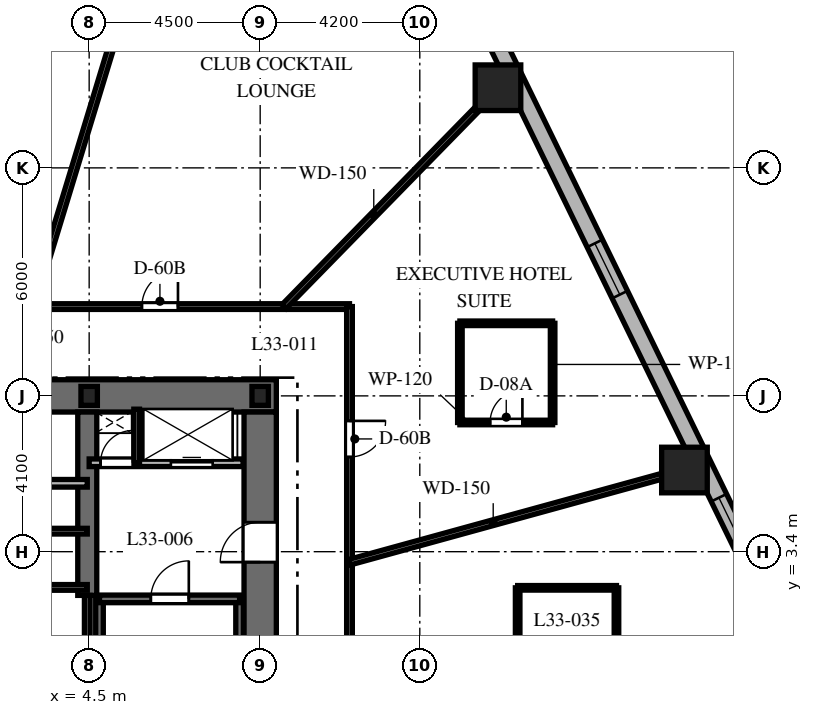
"""IFC4 building model, lengths in metres.
Left out: names, types, materials, properties, quantities, classifications, styles, units other than length and angle.
Written with IfcOpenShell. Run it as: python <this file> out.ifc"""

import sys

from ifc_helpers import new_model, si_unit, direction, frame, frame_2d, origin, origin_2d, place, context, subcontext, project, spatial, rectangle, i_section, extrude, element, fill, save


model = new_model("IFC4")
c1 = context("Model", 3, precision=1e-05, world=origin(), true_north=direction((0.0, 1.0)))
c2 = subcontext(c1, "Body", "Model", "MODEL_VIEW")
j1 = project(units=[si_unit("LENGTHUNIT", "METRE"), si_unit("PLANEANGLEUNIT", "RADIAN")], contexts=[c1])
p1 = place(None, origin())
s1 = spatial("IfcSite", under=j1, at=p1, CompositionType="ELEMENT")
p2 = place(p1, origin())
s2 = spatial("IfcBuilding", under=s1, at=p2, CompositionType="ELEMENT")
p3 = place(p2, frame((0.0, 0.0, 135.8)))
s3 = spatial("IfcBuildingStorey", under=s2, at=p3, CompositionType="ELEMENT", Elevation=135.8)
p4 = place(p3, frame((1.85, 7.5, 0.0), z_axis=(0.0, 0.0, 1.0), x_axis=(1.0, 0.0, 0.0)))
e1 = element("IfcWall", 1, at=p4, inside=s3, PredefinedType="SHEAR", context=c2, shape_type="SweptSolid", body=[
    extrude(rectangle(XDim=7.575, YDim=0.85, at=frame_2d((3.788, 0.0))), origin(), (0.0, 0.0, 1.0), 3.7),
])
p5 = place(p3, frame((9.0, -7.075, 0.0), z_axis=(0.0, 0.0, 1.0), x_axis=(0.0, 1.0, 0.0)))
e2 = element("IfcWall", 2, at=p5, inside=s3, PredefinedType="SHEAR", context=c2, shape_type="SweptSolid", body=[
    extrude(rectangle(XDim=14.15, YDim=0.85, at=frame_2d((7.075, 0.0))), origin(), (0.0, 0.0, 1.0), 3.7),
])
p6 = place(p5, frame((10.2, 0.0, 0.0)))
e3 = element("IfcOpeningElement", 3, at=p6, cuts=e2, PredefinedType="OPENING", context=c2, shape_type="SweptSolid", body=[
    extrude(rectangle(XDim=1.05, YDim=2.15, at=frame_2d((0.525, 1.075))), frame((0.0, 0.435, 0.0), z_axis=(0.0, -1.0, 0.0), x_axis=(1.0, 0.0, 0.0)), (0.0, 0.0, 1.0), 0.87),
])
p7 = place(p3, frame((4.45, 2.25, 0.0), z_axis=(0.0, 0.0, 1.0), x_axis=(0.0, 1.0, 0.0)))
e4 = element("IfcWall", 4, at=p7, inside=s3, PredefinedType="SHEAR", context=c2, shape_type="SweptSolid", body=[
    extrude(rectangle(XDim=4.825, YDim=0.5, at=frame_2d((2.413, 0.0))), origin(), (0.0, 0.0, 1.0), 3.7),
])
for number, where, z_axis, x_axis in (
    (5, (4.772, -6.985, 0.0), (0.0, 0.0, 1.0), (0.0, 1.0, 0.0)),
    (6, (8.458, -6.985, 0.0), (0.0, 0.0, 1.0), (0.0, 1.0, 0.0)),
):
    element("IfcWall", number, at=place(p3, frame(where, z_axis=z_axis, x_axis=x_axis)), inside=s3, PredefinedType="SHEAR", context=c2, shape_type="SweptSolid", body=[
        extrude(rectangle(XDim=9.143, YDim=0.2, at=frame_2d((4.572, 0.0))), origin(), (0.0, 0.0, 1.0), 3.7),
    ])
p8 = place(p3, frame((4.772, 2.158, 0.0), z_axis=(0.0, 0.0, 1.0), x_axis=(1.0, 0.0, 0.0)))
e7 = element("IfcWall", 7, at=p8, inside=s3, PredefinedType="SHEAR", context=c2, shape_type="SweptSolid", body=[
    extrude(rectangle(XDim=3.686, YDim=0.2, at=frame_2d((1.843, 0.0))), origin(), (0.0, 0.0, 1.0), 3.7),
])
p9 = place(p8, frame((1.35, 0.0, 0.0)))
e8 = element("IfcOpeningElement", 8, at=p9, cuts=e7, PredefinedType="OPENING", context=c2, shape_type="SweptSolid", body=[
    extrude(rectangle(XDim=1.0, YDim=2.15, at=frame_2d((0.5, 1.075))), frame((0.0, 0.11, 0.0), z_axis=(0.0, -1.0, 0.0), x_axis=(1.0, 0.0, 0.0)), (0.0, 0.0, 1.0), 0.22),
])
for number, where, z_axis, x_axis in (
    (9, (9.0, 7.5, 0.0), (0.0, 0.0, 1.0), (1.0, 0.0, 0.0)),
    (10, (4.5, 7.5, 0.0), (0.0, 0.0, 1.0), (1.0, 0.0, 0.0)),
):
    element("IfcColumn", number, at=place(p3, frame(where, z_axis=z_axis, x_axis=x_axis)), inside=s3, PredefinedType="COLUMN", context=c2, shape_type="SweptSolid", body=[
        extrude(i_section(OverallWidth=0.432, OverallDepth=0.498, WebThickness=0.056, FlangeThickness=0.089, at=origin_2d()), origin(), (0.0, 0.0, 1.0), 3.7),
    ])
for number, where, z_axis, x_axis in (
    (11, (20.164, 5.549, 0.0), (0.0, 0.0, 1.0), (1.0, 0.0, 0.0)),
    (12, (15.257, 15.609, 0.0), (0.0, 0.0, 1.0), (1.0, 0.0, 0.0)),
):
    element("IfcColumn", number, at=place(p3, frame(where, z_axis=z_axis, x_axis=x_axis)), inside=s3, PredefinedType="COLUMN", context=c2, shape_type="SweptSolid", body=[
        extrude(rectangle(XDim=1.2, YDim=1.2, at=origin_2d()), origin(), (0.0, 0.0, 1.0), 3.7),
    ])
p10 = place(p3, frame((22.238, 2.427, 0.0), z_axis=(0.0, 0.0, 1.0), x_axis=(-0.438374803278, 0.898792262901, 0.0)))
e13 = element("IfcWall", 13, at=p10, inside=s3, PredefinedType="SOLIDWALL", context=c2, shape_type="SweptSolid", body=[
    extrude(rectangle(XDim=18.618, YDim=0.45, at=frame_2d((9.309, 0.0))), origin(), (0.0, 0.0, 1.0), 3.38),
])
p11 = place(p10, frame((8.61, 0.0, 0.8)))
e14 = element("IfcOpeningElement", 14, at=p11, cuts=e13, PredefinedType="OPENING", context=c2, shape_type="SweptSolid", body=[
    extrude(rectangle(XDim=1.5, YDim=1.8, at=frame_2d((0.75, 0.9))), frame((0.0, 0.235, 0.0), z_axis=(0.0, -1.0, 0.0), x_axis=(1.0, 0.0, 0.0)), (0.0, 0.0, 1.0), 0.47),
])
p12 = place(p10, frame((16.006, 0.0, 0.8)))
e15 = element("IfcOpeningElement", 15, at=p12, cuts=e13, PredefinedType="OPENING", context=c2, shape_type="SweptSolid", body=[
    extrude(rectangle(XDim=1.5, YDim=1.8, at=frame_2d((0.75, 0.9))), frame((0.0, 0.235, 0.0), z_axis=(0.0, -1.0, 0.0), x_axis=(1.0, 0.0, 0.0)), (0.0, 0.0, 1.0), 0.47),
])
p13 = place(p10, frame((1.163, 0.0, 0.8)))
e16 = element("IfcOpeningElement", 16, at=p13, cuts=e13, PredefinedType="OPENING", context=c2, shape_type="SweptSolid", body=[
    extrude(rectangle(XDim=1.5, YDim=1.8, at=frame_2d((0.75, 0.9))), frame((0.0, 0.235, 0.0), z_axis=(0.0, -1.0, 0.0), x_axis=(1.0, 0.0, 0.0)), (0.0, 0.0, 1.0), 0.47),
])
p14 = place(p3, frame((4.5, 5.74, 0.0), z_axis=(0.0, 0.0, 1.0), x_axis=(1.0, 0.0, 0.0)))
e17 = element("IfcWall", 17, at=p14, inside=s3, PredefinedType="PARTITIONING", context=c2, shape_type="SweptSolid", body=[
    extrude(rectangle(XDim=4.05, YDim=0.2, at=frame_2d((2.025, 0.0))), origin(), (0.0, 0.0, 1.0), 3.38),
])
p15 = place(p14, frame((0.3, 0.0, 0.0)))
e18 = element("IfcOpeningElement", 18, at=p15, cuts=e17, PredefinedType="OPENING", context=c2, shape_type="SweptSolid", body=[
    extrude(rectangle(XDim=0.85, YDim=2.03, at=frame_2d((0.425, 1.015))), frame((0.0, 0.11, 0.0), z_axis=(0.0, -1.0, 0.0), x_axis=(1.0, 0.0, 0.0)), (0.0, 0.0, 1.0), 0.22),
])
p16 = place(p14, frame((2.15, 0.0, 0.0)))
e19 = element("IfcOpeningElement", 19, at=p16, cuts=e17, PredefinedType="OPENING", context=c2, shape_type="SweptSolid", body=[
    extrude(rectangle(XDim=1.1, YDim=2.2, at=frame_2d((0.55, 1.1))), frame((0.0, 0.11, 0.0), z_axis=(0.0, -1.0, 0.0), x_axis=(1.0, 0.0, 0.0)), (0.0, 0.0, 1.0), 0.22),
])
p17 = place(p3, frame((5.75, 5.74, 0.0), z_axis=(0.0, 0.0, 1.0), x_axis=(0.0, 1.0, 0.0)))
e20 = element("IfcWall", 20, at=p17, inside=s3, PredefinedType="PARTITIONING", context=c2, shape_type="SweptSolid", body=[
    extrude(rectangle(XDim=1.41, YDim=0.15, at=frame_2d((0.705, 0.0))), origin(), (0.0, 0.0, 1.0), 3.38),
])
p18 = place(p3, frame((1.85, 5.2, 0.0), z_axis=(0.0, 0.0, 1.0), x_axis=(1.0, 0.0, 0.0)))
e21 = element("IfcWall", 21, at=p18, inside=s3, PredefinedType="PARTITIONING", context=c2, shape_type="SweptSolid", body=[
    extrude(rectangle(XDim=2.6, YDim=0.2, at=frame_2d((1.3, 0.0))), origin(), (0.0, 0.0, 1.0), 3.38),
])
p19 = place(p3, frame((4.45, -1.972, 0.0), z_axis=(0.0, 0.0, 1.0), x_axis=(0.0, 1.0, 0.0)))
e22 = element("IfcWall", 22, at=p19, inside=s3, PredefinedType="PARTITIONING", context=c2, shape_type="SweptSolid", body=[
    extrude(rectangle(XDim=4.222, YDim=0.15, at=frame_2d((2.111, 0.0))), origin(), (0.0, 0.0, 1.0), 3.38),
])
for number, where, z_axis, x_axis in (
    (23, (1.9, 3.94, 0.0), (0.0, 0.0, 1.0), (1.0, 0.0, 0.0)),
    (24, (1.9, 2.46, 0.0), (0.0, 0.0, 1.0), (1.0, 0.0, 0.0)),
):
    element("IfcWall", number, at=place(p3, frame(where, z_axis=z_axis, x_axis=x_axis)), inside=s3, PredefinedType="PARTITIONING", context=c2, shape_type="SweptSolid", body=[
        extrude(rectangle(XDim=2.55, YDim=0.15, at=frame_2d((1.275, 0.0))), origin(), (0.0, 0.0, 1.0), 3.38),
    ])
p20 = place(p3, frame((-11.35, 9.85, 0.0), z_axis=(0.0, 0.0, 1.0), x_axis=(1.0, 0.0, 0.0)))
e25 = element("IfcWall", 25, at=p20, inside=s3, PredefinedType="PARTITIONING", context=c2, shape_type="SweptSolid", body=[
    extrude(rectangle(XDim=22.7, YDim=0.15, at=frame_2d((11.35, 0.0))), origin(), (0.0, 0.0, 1.0), 2.82),
])
p21 = place(p20, frame((17.237, 0.0, 0.0)))
e26 = element("IfcOpeningElement", 26, at=p21, cuts=e25, PredefinedType="OPENING", context=c2, shape_type="SweptSolid", body=[
    extrude(rectangle(XDim=0.95, YDim=2.03, at=frame_2d((0.475, 1.015))), frame((0.0, 0.085, 0.0), z_axis=(0.0, -1.0, 0.0), x_axis=(1.0, 0.0, 0.0)), (0.0, 0.0, 1.0), 0.17),
])
p22 = place(p20, frame((10.45, 0.0, 0.0)))
e27 = element("IfcOpeningElement", 27, at=p22, cuts=e25, PredefinedType="OPENING", context=c2, shape_type="SweptSolid", body=[
    extrude(rectangle(XDim=0.95, YDim=2.03, at=frame_2d((0.475, 1.015))), frame((0.0, 0.085, 0.0), z_axis=(0.0, -1.0, 0.0), x_axis=(1.0, 0.0, 0.0)), (0.0, 0.0, 1.0), 0.17),
])
p23 = place(p20, frame((5.522, 0.0, 0.0)))
e28 = element("IfcOpeningElement", 28, at=p23, cuts=e25, PredefinedType="OPENING", context=c2, shape_type="SweptSolid", body=[
    extrude(rectangle(XDim=0.9, YDim=2.03, at=frame_2d((0.45, 1.015))), frame((0.0, 0.085, 0.0), z_axis=(0.0, -1.0, 0.0), x_axis=(1.0, 0.0, 0.0)), (0.0, 0.0, 1.0), 0.17),
])
p24 = place(p20, frame((1.914, 0.0, 0.0)))
e29 = element("IfcOpeningElement", 29, at=p24, cuts=e25, PredefinedType="OPENING", context=c2, shape_type="SweptSolid", body=[
    extrude(rectangle(XDim=0.9, YDim=2.03, at=frame_2d((0.45, 1.015))), frame((0.0, 0.085, 0.0), z_axis=(0.0, -1.0, 0.0), x_axis=(1.0, 0.0, 0.0)), (0.0, 0.0, 1.0), 0.17),
])
p25 = place(p3, frame((11.35, 9.85, 0.0), z_axis=(0.0, 0.0, 1.0), x_axis=(0.0, -1.0, 0.0)))
e30 = element("IfcWall", 30, at=p25, inside=s3, PredefinedType="PARTITIONING", context=c2, shape_type="SweptSolid", body=[
    extrude(rectangle(XDim=19.7, YDim=0.15, at=frame_2d((9.85, 0.0))), origin(), (0.0, 0.0, 1.0), 2.82),
])
p26 = place(p25, frame((3.008, 0.0, 0.0)))
e31 = element("IfcOpeningElement", 31, at=p26, cuts=e30, PredefinedType="OPENING", context=c2, shape_type="SweptSolid", body=[
    extrude(rectangle(XDim=0.95, YDim=2.03, at=frame_2d((0.475, 1.015))), frame((0.0, 0.085, 0.0), z_axis=(0.0, -1.0, 0.0), x_axis=(1.0, 0.0, 0.0)), (0.0, 0.0, 1.0), 0.17),
])
p27 = place(p25, frame((15.205, 0.0, 0.0)))
e32 = element("IfcOpeningElement", 32, at=p27, cuts=e30, PredefinedType="OPENING", context=c2, shape_type="SweptSolid", body=[
    extrude(rectangle(XDim=0.95, YDim=2.03, at=frame_2d((0.475, 1.015))), frame((0.0, 0.085, 0.0), z_axis=(0.0, -1.0, 0.0), x_axis=(1.0, 0.0, 0.0)), (0.0, 0.0, 1.0), 0.17),
])
p28 = place(p25, frame((8.836, 0.0, 0.0)))
e33 = element("IfcOpeningElement", 33, at=p28, cuts=e30, PredefinedType="OPENING", context=c2, shape_type="SweptSolid", body=[
    extrude(rectangle(XDim=0.95, YDim=2.03, at=frame_2d((0.475, 1.015))), frame((0.0, 0.085, 0.0), z_axis=(0.0, -1.0, 0.0), x_axis=(1.0, 0.0, 0.0)), (0.0, 0.0, 1.0), 0.17),
])
p29 = place(p3, frame((11.35, 3.123, 0.0), z_axis=(0.0, 0.0, 1.0), x_axis=(0.964151983214, 0.265350623261, 0.0)))
e34 = element("IfcWall", 34, at=p29, inside=s3, PredefinedType="PARTITIONING", context=c2, shape_type="SweptSolid", body=[
    extrude(rectangle(XDim=9.645, YDim=0.15, at=frame_2d((4.823, 0.0))), origin(), (0.0, 0.0, 1.0), 2.52),
])
p30 = place(p3, frame((9.628, 9.85, 0.0), z_axis=(0.0, 0.0, 1.0), x_axis=(0.698992824326, 0.715128681805, 0.0)))
e35 = element("IfcWall", 35, at=p30, inside=s3, PredefinedType="PARTITIONING", context=c2, shape_type="SweptSolid", body=[
    extrude(rectangle(XDim=8.579, YDim=0.15, at=frame_2d((4.29, 0.0))), origin(), (0.0, 0.0, 1.0), 2.52),
])
p31 = place(p3, frame((3.0, 9.85, 0.0), z_axis=(0.0, 0.0, 1.0), x_axis=(0.291352035382, 0.95661590593, 0.0)))
e36 = element("IfcWall", 36, at=p31, inside=s3, PredefinedType="PARTITIONING", context=c2, shape_type="SweptSolid", body=[
    extrude(rectangle(XDim=11.734, YDim=0.15, at=frame_2d((5.867, 0.0))), origin(), (0.0, 0.0, 1.0), 2.52),
])
p32 = place(p3, frame((14.255, 6.8, 0.0), z_axis=(0.0, 0.0, 1.0), x_axis=(1.0, 0.0, 0.0)))
e37 = element("IfcWall", 37, at=p32, inside=s3, PredefinedType="PARTITIONING", context=c2, shape_type="SweptSolid", body=[
    extrude(rectangle(XDim=2.44, YDim=0.12, at=frame_2d((1.22, 0.0))), origin(), (0.0, 0.0, 1.0), 2.906),
])
p33 = place(p32, frame((0.795, 0.0, 0.0)))
e38 = element("IfcOpeningElement", 38, at=p33, cuts=e37, PredefinedType="OPENING", context=c2, shape_type="SweptSolid", body=[
    extrude(rectangle(XDim=0.85, YDim=2.03, at=frame_2d((0.425, 1.015))), frame((0.0, 0.07, 0.0), z_axis=(0.0, -1.0, 0.0), x_axis=(1.0, 0.0, 0.0)), (0.0, 0.0, 1.0), 0.14),
])
p34 = place(p3, frame((16.695, 6.8, 0.0), z_axis=(0.0, 0.0, 1.0), x_axis=(0.0, 1.0, 0.0)))
e39 = element("IfcWall", 39, at=p34, inside=s3, PredefinedType="PARTITIONING", context=c2, shape_type="SweptSolid", body=[
    extrude(rectangle(XDim=2.61, YDim=0.12, at=frame_2d((1.305, 0.0))), origin(), (0.0, 0.0, 1.0), 3.38),
])
p35 = place(p3, frame((16.695, 9.41, 0.0), z_axis=(0.0, 0.0, 1.0), x_axis=(-1.0, 0.0, 0.0)))
e40 = element("IfcWall", 40, at=p35, inside=s3, PredefinedType="PARTITIONING", context=c2, shape_type="SweptSolid", body=[
    extrude(rectangle(XDim=2.44, YDim=0.12, at=frame_2d((1.22, 0.0))), origin(), (0.0, 0.0, 1.0), 2.906),
])
p36 = place(p3, frame((14.255, 9.41, 0.0), z_axis=(0.0, 0.0, 1.0), x_axis=(0.0, -1.0, 0.0)))
e41 = element("IfcWall", 41, at=p36, inside=s3, PredefinedType="PARTITIONING", context=c2, shape_type="SweptSolid", body=[
    extrude(rectangle(XDim=2.61, YDim=0.12, at=frame_2d((1.305, 0.0))), origin(), (0.0, 0.0, 1.0), 3.38),
])
p37 = place(p3, frame((18.375, -0.301, 0.0), z_axis=(0.0, 0.0, 1.0), x_axis=(0.0, 1.0, 0.0)))
e42 = element("IfcWall", 42, at=p37, inside=s3, PredefinedType="PARTITIONING", context=c2, shape_type="SweptSolid", body=[
    extrude(rectangle(XDim=2.75, YDim=0.12, at=frame_2d((1.375, 0.0))), origin(), (0.0, 0.0, 1.0), 3.38),
])
p38 = place(p3, frame((18.375, 2.449, 0.0), z_axis=(0.0, 0.0, 1.0), x_axis=(-1.0, 0.0, 0.0)))
e43 = element("IfcWall", 43, at=p38, inside=s3, PredefinedType="PARTITIONING", context=c2, shape_type="SweptSolid", body=[
    extrude(rectangle(XDim=2.6, YDim=0.12, at=frame_2d((1.3, 0.0))), origin(), (0.0, 0.0, 1.0), 2.821),
])
p39 = place(p3, frame((15.775, 2.449, 0.0), z_axis=(0.0, 0.0, 1.0), x_axis=(0.0, -1.0, 0.0)))
e44 = element("IfcWall", 44, at=p39, inside=s3, PredefinedType="PARTITIONING", context=c2, shape_type="SweptSolid", body=[
    extrude(rectangle(XDim=2.75, YDim=0.12, at=frame_2d((1.375, 0.0))), origin(), (0.0, 0.0, 1.0), 3.38),
])
p40 = place(p11, origin())
e45 = element("IfcWindow", 45, at=p40, inside=s3, PartitioningType="SINGLE_PANEL", PredefinedType="WINDOW", context=c2, shape_type="SweptSolid", body=[
    extrude(rectangle(XDim=1.5, YDim=1.8, at=frame_2d((0.75, 0.9))), frame((0.0, 0.03, 0.0), z_axis=(0.0, -1.0, 0.0), x_axis=(1.0, 0.0, 0.0)), (0.0, 0.0, 1.0), 0.06),
])
fill(e14, e45)
p41 = place(p13, origin())
e46 = element("IfcWindow", 46, at=p41, inside=s3, PartitioningType="SINGLE_PANEL", PredefinedType="WINDOW", context=c2, shape_type="SweptSolid", body=[
    extrude(rectangle(XDim=1.5, YDim=1.8, at=frame_2d((0.75, 0.9))), frame((0.0, 0.03, 0.0), z_axis=(0.0, -1.0, 0.0), x_axis=(1.0, 0.0, 0.0)), (0.0, 0.0, 1.0), 0.06),
])
fill(e16, e46)
p42 = place(p9, origin())
e47 = element("IfcDoor", 47, at=p42, inside=s3, OperationType="SINGLE_SWING_RIGHT", PredefinedType="DOOR", context=c2, shape_type="SweptSolid", body=[
    extrude(rectangle(XDim=1.0, YDim=2.15, at=frame_2d((0.5, 1.075))), frame((0.0, 0.025, 0.0), z_axis=(0.0, -1.0, 0.0), x_axis=(1.0, 0.0, 0.0)), (0.0, 0.0, 1.0), 0.05),
])
fill(e8, e47)
p43 = place(p6, origin())
e48 = element("IfcDoor", 48, at=p43, inside=s3, OperationType="SINGLE_SWING_LEFT", PredefinedType="DOOR", context=c2, shape_type="SweptSolid", body=[
    extrude(rectangle(XDim=1.05, YDim=2.15, at=frame_2d((0.525, 1.075))), frame((0.0, 0.025, 0.0), z_axis=(0.0, -1.0, 0.0), x_axis=(1.0, 0.0, 0.0)), (0.0, 0.0, 1.0), 0.05),
])
fill(e3, e48)
p44 = place(p15, origin())
e49 = element("IfcDoor", 49, at=p44, inside=s3, OperationType="SINGLE_SWING_RIGHT", PredefinedType="DOOR", context=c2, shape_type="SweptSolid", body=[
    extrude(rectangle(XDim=0.85, YDim=2.03, at=frame_2d((0.425, 1.015))), frame((0.0, 0.025, 0.0), z_axis=(0.0, -1.0, 0.0), x_axis=(1.0, 0.0, 0.0)), (0.0, 0.0, 1.0), 0.05),
])
fill(e18, e49)
p45 = place(p16, origin())
e50 = element("IfcDoor", 50, at=p45, inside=s3, OperationType="SLIDING_TO_RIGHT", PredefinedType="DOOR", context=c2, shape_type="SweptSolid", body=[
    extrude(rectangle(XDim=1.1, YDim=2.2, at=frame_2d((0.55, 1.1))), frame((0.0, 0.025, 0.0), z_axis=(0.0, -1.0, 0.0), x_axis=(1.0, 0.0, 0.0)), (0.0, 0.0, 1.0), 0.05),
])
fill(e19, e50)
p46 = place(p26, origin())
e51 = element("IfcDoor", 51, at=p46, inside=s3, OperationType="SINGLE_SWING_LEFT", PredefinedType="DOOR", context=c2, shape_type="SweptSolid", body=[
    extrude(rectangle(XDim=0.95, YDim=2.03, at=frame_2d((0.475, 1.015))), frame((0.0, 0.025, 0.0), z_axis=(0.0, -1.0, 0.0), x_axis=(1.0, 0.0, 0.0)), (0.0, 0.0, 1.0), 0.05),
])
fill(e31, e51)
p47 = place(p33, origin())
e52 = element("IfcDoor", 52, at=p47, inside=s3, OperationType="SINGLE_SWING_RIGHT", PredefinedType="DOOR", context=c2, shape_type="SweptSolid", body=[
    extrude(rectangle(XDim=0.85, YDim=2.03, at=frame_2d((0.425, 1.015))), frame((0.0, 0.025, 0.0), z_axis=(0.0, -1.0, 0.0), x_axis=(1.0, 0.0, 0.0)), (0.0, 0.0, 1.0), 0.05),
])
fill(e38, e52)
p48 = place(p21, origin())
e53 = element("IfcDoor", 53, at=p48, inside=s3, OperationType="SINGLE_SWING_RIGHT", PredefinedType="DOOR", context=c2, shape_type="SweptSolid", body=[
    extrude(rectangle(XDim=0.95, YDim=2.03, at=frame_2d((0.475, 1.015))), frame((0.0, 0.025, 0.0), z_axis=(0.0, -1.0, 0.0), x_axis=(1.0, 0.0, 0.0)), (0.0, 0.0, 1.0), 0.05),
])
fill(e26, e53)
save(model, sys.argv[1])
